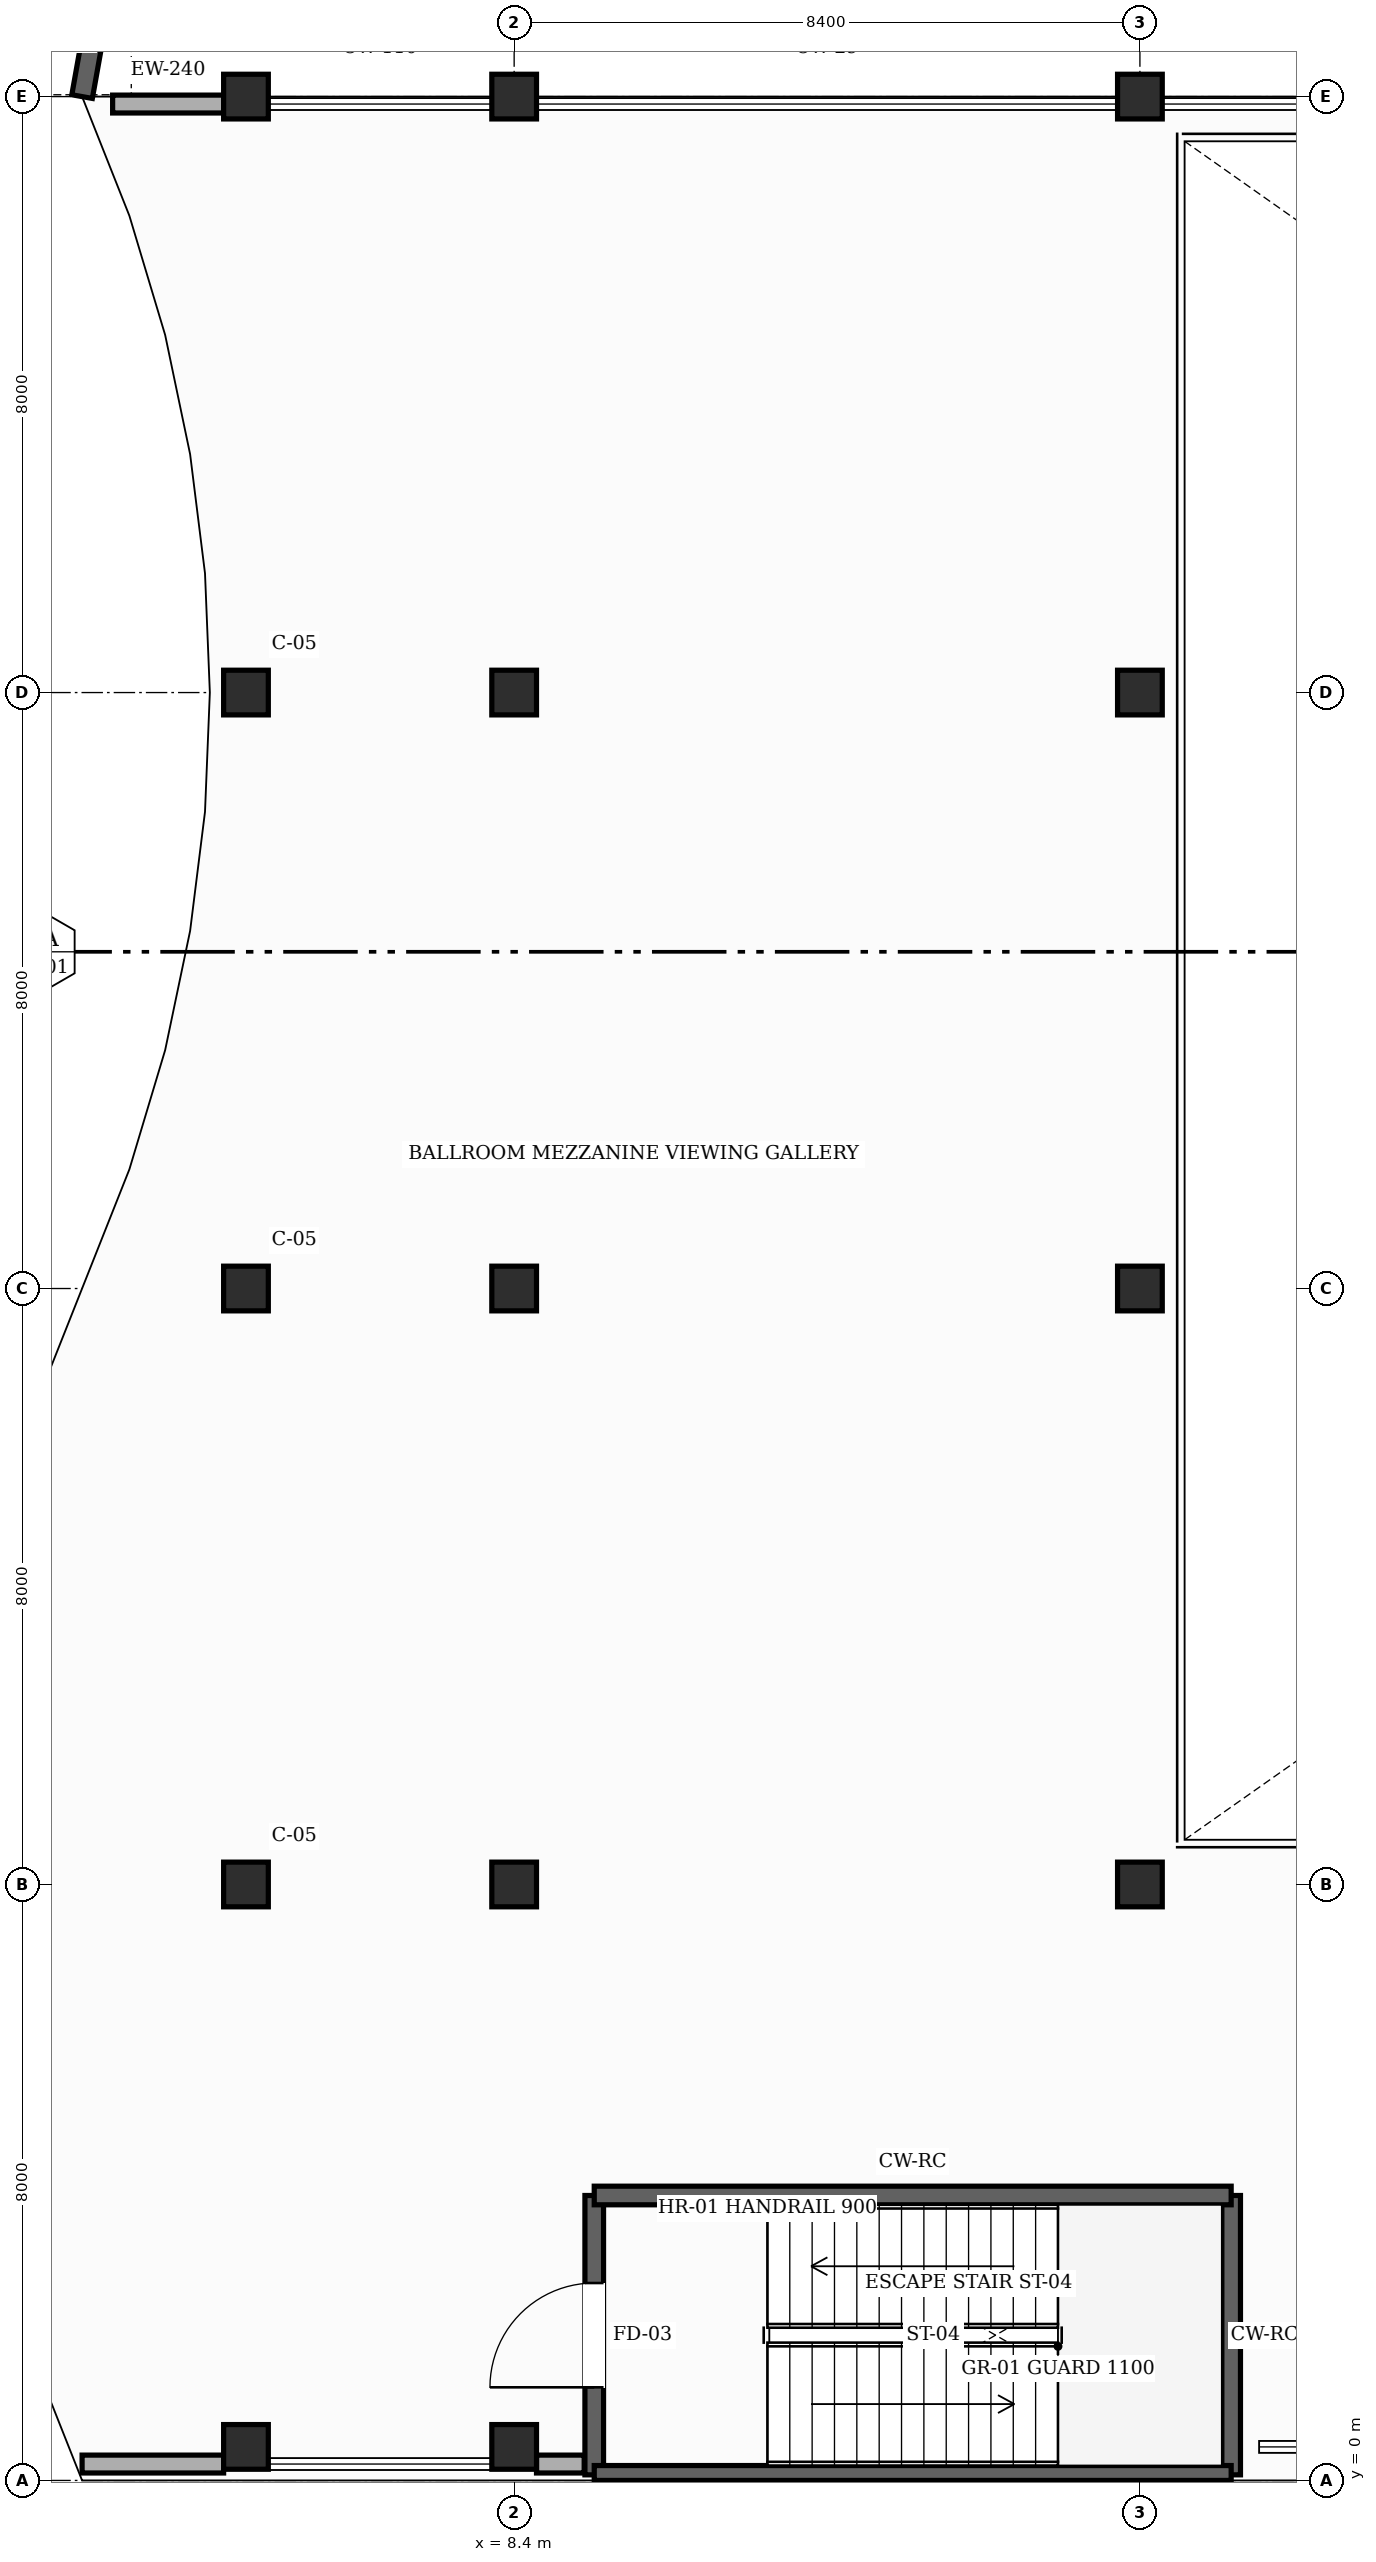
"""IFC4 building model, lengths in metres.
Left out: names, types, materials, properties, quantities, classifications, styles, units other than length and angle.
Written with IfcOpenShell. Run it as: python <this file> out.ifc"""

import sys

from ifc_helpers import new_model, si_unit, direction, frame, frame_2d, origin, origin_2d, place, context, subcontext, project, spatial, polyline, rectangle, hollow_rectangle, outline, extrude, element, fill, save


model = new_model("IFC4")
c1 = context("Model", 3, precision=1e-05, world=origin(), true_north=direction((0.0, 1.0)))
c2 = subcontext(c1, "Body", "Model", "MODEL_VIEW")
j1 = project(units=[si_unit("LENGTHUNIT", "METRE"), si_unit("PLANEANGLEUNIT", "RADIAN")], contexts=[c1])
p1 = place(None, origin())
s1 = spatial("IfcSite", under=j1, at=p1, CompositionType="ELEMENT")
p2 = place(p1, origin())
s2 = spatial("IfcBuilding", under=s1, at=p2, CompositionType="ELEMENT")
p3 = place(p2, frame((0.0, 0.0, 5.4)))
s3 = spatial("IfcBuildingStorey", under=s2, at=p3, CompositionType="ELEMENT", Elevation=5.4)
for number, where, z_axis, x_axis in (
    (1, (4.8, 0.45, 0.0), (0.0, 0.0, 1.0), (1.0, 0.0, 0.0)),
    (2, (4.8, 8.0, 0.0), (0.0, 0.0, 1.0), (1.0, 0.0, 0.0)),
    (3, (4.8, 16.0, 0.0), (0.0, 0.0, 1.0), (1.0, 0.0, 0.0)),
    (4, (4.8, 24.0, 0.0), (0.0, 0.0, 1.0), (1.0, 0.0, 0.0)),
    (5, (4.8, 32.0, 0.0), (0.0, 0.0, 1.0), (1.0, 0.0, 0.0)),
    (6, (8.4, 0.45, 0.0), (0.0, 0.0, 1.0), (1.0, 0.0, 0.0)),
    (7, (8.4, 8.0, 0.0), (0.0, 0.0, 1.0), (1.0, 0.0, 0.0)),
    (8, (8.4, 16.0, 0.0), (0.0, 0.0, 1.0), (1.0, 0.0, 0.0)),
    (9, (8.4, 24.0, 0.0), (0.0, 0.0, 1.0), (1.0, 0.0, 0.0)),
    (10, (8.4, 32.0, 0.0), (0.0, 0.0, 1.0), (1.0, 0.0, 0.0)),
):
    element("IfcColumn", number, at=place(p3, frame(where, z_axis=z_axis, x_axis=x_axis)), inside=s3, PredefinedType="COLUMN", context=c2, shape_type="SweptSolid", body=[
        extrude(hollow_rectangle(XDim=0.6, YDim=0.6, WallThickness=0.025, InnerFilletRadius=0.025, OuterFilletRadius=0.05, at=origin_2d()), origin(), (0.0, 0.0, 1.0), 5.79),
    ])
for number, where, z_axis, x_axis in (
    (11, (16.8, 8.0, 0.0), (0.0, 0.0, 1.0), (1.0, 0.0, 0.0)),
    (12, (16.8, 16.0, 0.0), (0.0, 0.0, 1.0), (1.0, 0.0, 0.0)),
    (13, (16.8, 24.0, 0.0), (0.0, 0.0, 1.0), (1.0, 0.0, 0.0)),
    (14, (16.8, 32.0, 0.0), (0.0, 0.0, 1.0), (1.0, 0.0, 0.0)),
):
    element("IfcColumn", number, at=place(p3, frame(where, z_axis=z_axis, x_axis=x_axis)), inside=s3, PredefinedType="COLUMN", context=c2, shape_type="SweptSolid", body=[
        extrude(hollow_rectangle(XDim=0.6, YDim=0.6, WallThickness=0.025, InnerFilletRadius=0.025, OuterFilletRadius=0.05, at=origin_2d()), origin(), (0.0, 0.0, 1.0), 4.55),
    ])
p4 = place(p3, frame((2.6, 32.0, -0.8), z_axis=(0.0, 0.0, 1.0), x_axis=(0.175936341867, 0.98440154592, 0.0)))
e15 = element("IfcWall", 15, at=p4, inside=s3, PredefinedType="SOLIDWALL", context=c2, shape_type="SweptSolid", body=[
    extrude(outline(polyline([(0.0, 0.0), (1.392, 0.0), (1.39, 8.565), (1.215, 8.55), (1.04, 8.545), (0.87, 8.55), (0.695, 8.56), (0.52, 8.58), (0.35, 8.605), (0.175, 8.64), (0.0, 8.685), (0.0, 0.0)])), frame((0.0, 0.14, 0.0), z_axis=(0.0, -1.0, 0.0), x_axis=(1.0, 0.0, 0.0)), (0.0, 0.0, 1.0), 0.28),
])
p5 = place(p3, frame((3.01, 31.9, 0.0), z_axis=(0.0, 0.0, 1.0), x_axis=(1.0, 0.0, 0.0)))
e16 = element("IfcWall", 16, at=p5, inside=s3, PredefinedType="SOLIDWALL", context=c2, shape_type="SweptSolid", body=[
    extrude(rectangle(XDim=1.49, YDim=0.24, at=frame_2d((0.745, 0.0))), origin(), (0.0, 0.0, 1.0), 4.535),
])
p6 = place(p3, frame((4.5, 0.22, 0.0), z_axis=(0.0, 0.0, 1.0), x_axis=(-1.0, 0.0, 0.0)))
e17 = element("IfcWall", 17, at=p6, inside=s3, PredefinedType="SOLIDWALL", context=c2, shape_type="SweptSolid", body=[
    extrude(rectangle(XDim=1.9, YDim=0.24, at=frame_2d((0.95, 0.0))), origin(), (0.0, 0.0, 1.0), 4.535),
])
p7 = place(p3, frame((9.34, 0.22, 0.0), z_axis=(0.0, 0.0, 1.0), x_axis=(-1.0, 0.0, 0.0)))
e18 = element("IfcWall", 18, at=p7, inside=s3, PredefinedType="SOLIDWALL", context=c2, shape_type="SweptSolid", body=[
    extrude(rectangle(XDim=0.64, YDim=0.24, at=frame_2d((0.32, 0.0))), origin(), (0.0, 0.0, 1.0), 4.535),
])
p8 = place(p3, frame((9.475, 0.075, 0.0), z_axis=(0.0, 0.0, 1.0), x_axis=(0.0, 1.0, 0.0)))
e19 = element("IfcWall", 19, at=p8, inside=s3, PredefinedType="SHEAR", context=c2, shape_type="SweptSolid", body=[
    extrude(rectangle(XDim=3.75, YDim=0.25, at=frame_2d((1.875, 0.0))), origin(), (0.0, 0.0, 1.0), 4.55),
])
p9 = place(p8, frame((1.175, 0.0, 0.0)))
e20 = element("IfcOpeningElement", 20, at=p9, cuts=e19, PredefinedType="OPENING", context=c2, shape_type="SweptSolid", body=[
    extrude(rectangle(XDim=1.4, YDim=2.25, at=frame_2d((0.7, 1.125))), frame((0.0, 0.135, 0.0), z_axis=(0.0, -1.0, 0.0), x_axis=(1.0, 0.0, 0.0)), (0.0, 0.0, 1.0), 0.27),
])
p10 = place(p3, frame((18.025, 3.825, 0.0), z_axis=(0.0, 0.0, 1.0), x_axis=(0.0, -1.0, 0.0)))
e21 = element("IfcWall", 21, at=p10, inside=s3, PredefinedType="SHEAR", context=c2, shape_type="SweptSolid", body=[
    extrude(rectangle(XDim=3.75, YDim=0.25, at=frame_2d((1.875, 0.0))), origin(), (0.0, 0.0, 1.0), 4.55),
])
for number, where, z_axis, x_axis in (
    (22, (18.025, 0.075, 0.0), (0.0, 0.0, 1.0), (-1.0, 0.0, 0.0)),
    (23, (9.475, 3.825, 0.0), (0.0, 0.0, 1.0), (1.0, 0.0, 0.0)),
):
    element("IfcWall", number, at=place(p3, frame(where, z_axis=z_axis, x_axis=x_axis)), inside=s3, PredefinedType="SHEAR", context=c2, shape_type="SweptSolid", body=[
        extrude(rectangle(XDim=8.55, YDim=0.25, at=frame_2d((4.275, 0.0))), origin(), (0.0, 0.0, 1.0), 4.55),
    ])
p11 = place(p9, origin())
e24 = element("IfcDoor", 24, at=p11, inside=s3, OperationType="SINGLE_SWING_LEFT", PredefinedType="DOOR", context=c2, shape_type="SweptSolid", body=[
    extrude(rectangle(XDim=1.4, YDim=2.25, at=frame_2d((0.7, 1.125))), frame((0.0, 0.025, 0.0), z_axis=(0.0, -1.0, 0.0), x_axis=(1.0, 0.0, 0.0)), (0.0, 0.0, 1.0), 0.05),
])
fill(e20, e24)
save(model, sys.argv[1])
